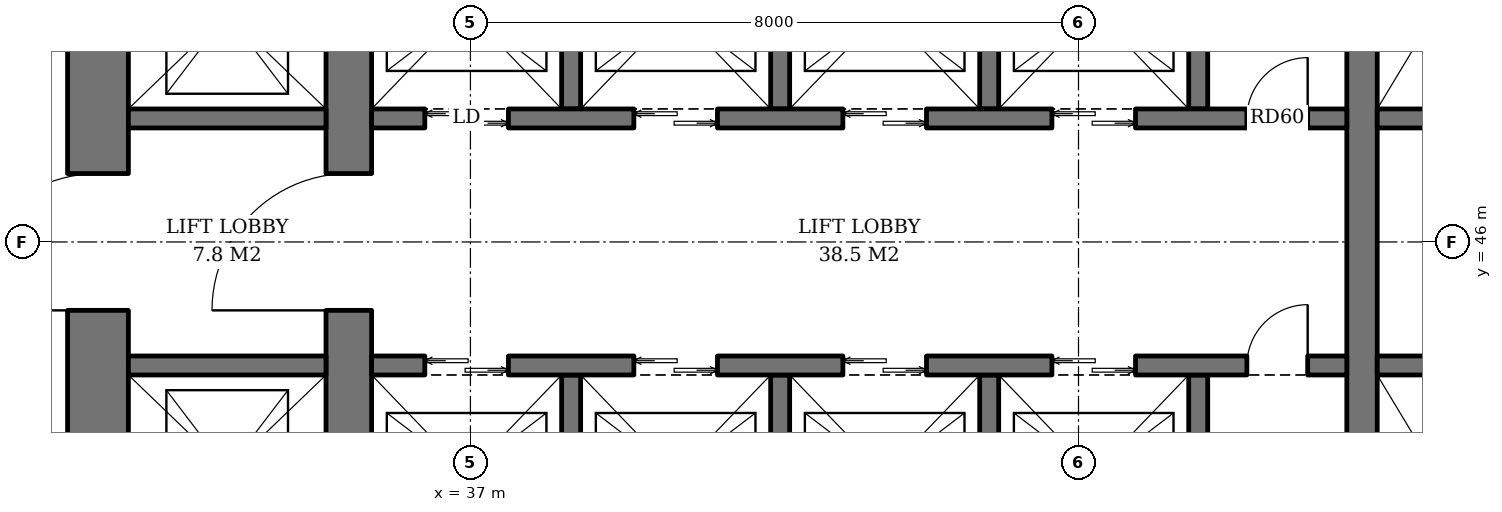
"""IFC4 building model, lengths in metres.
Left out: names, types, materials, properties, quantities, classifications, styles, units other than length and angle.
Written with IfcOpenShell. Run it as: python <this file> out.ifc"""

import sys

from ifc_helpers import new_model, si_unit, direction, frame, frame_2d, origin, place, context, subcontext, project, spatial, rectangle, extrude, element, fill, save


model = new_model("IFC4")
c1 = context("Model", 3, precision=1e-05, world=origin(), true_north=direction((0.0, 1.0)))
c2 = subcontext(c1, "Body", "Model", "MODEL_VIEW")
j1 = project(units=[si_unit("LENGTHUNIT", "METRE"), si_unit("PLANEANGLEUNIT", "RADIAN")], contexts=[c1])
p1 = place(None, origin())
s1 = spatial("IfcSite", under=j1, at=p1, CompositionType="ELEMENT")
p2 = place(p1, origin())
s2 = spatial("IfcBuilding", under=s1, at=p2, CompositionType="ELEMENT")
p3 = place(p2, frame((0.0, 0.0, 74.2)))
s3 = spatial("IfcBuildingStorey", under=s2, at=p3, CompositionType="ELEMENT", Elevation=74.2)
p4 = place(p3, frame((35.4, 36.7, 0.0), z_axis=(0.0, 0.0, 1.0), x_axis=(0.0, 1.0, 0.0)))
e1 = element("IfcWall", 1, at=p4, inside=s3, PredefinedType="SHEAR", context=c2, shape_type="SweptSolid", body=[
    extrude(rectangle(XDim=18.6, YDim=0.6, at=frame_2d((9.3, 0.0))), origin(), (0.0, 0.0, 1.0), 3.8),
])
p5 = place(p4, frame((8.4, 0.0, 0.0)))
e2 = element("IfcOpeningElement", 2, at=p5, cuts=e1, PredefinedType="OPENING", context=c2, shape_type="SweptSolid", body=[
    extrude(rectangle(XDim=1.8, YDim=2.4, at=frame_2d((0.9, 1.2))), frame((0.0, 0.31, 0.0), z_axis=(0.0, -1.0, 0.0), x_axis=(1.0, 0.0, 0.0)), (0.0, 0.0, 1.0), 0.62),
])
p6 = place(p3, frame((32.1, 33.5, 0.0), z_axis=(0.0, 0.0, 1.0), x_axis=(0.0, 1.0, 0.0)))
e3 = element("IfcWall", 3, at=p6, inside=s3, PredefinedType="SHEAR", context=c2, shape_type="SweptSolid", body=[
    extrude(rectangle(XDim=25.0, YDim=0.8, at=frame_2d((12.5, 0.0))), origin(), (0.0, 0.0, 1.0), 3.8),
])
p7 = place(p6, frame((11.6, 0.0, 0.0)))
e4 = element("IfcOpeningElement", 4, at=p7, cuts=e3, PredefinedType="OPENING", context=c2, shape_type="SweptSolid", body=[
    extrude(rectangle(XDim=1.8, YDim=2.4, at=frame_2d((0.9, 1.2))), frame((0.0, 0.41, 0.0), z_axis=(0.0, -1.0, 0.0), x_axis=(1.0, 0.0, 0.0)), (0.0, 0.0, 1.0), 0.82),
])
p8 = place(p3, frame((48.73, 40.0, 0.0), z_axis=(0.0, 0.0, 1.0), x_axis=(0.0, 1.0, 0.0)))
e5 = element("IfcWall", 5, at=p8, inside=s3, PredefinedType="SHEAR", context=c2, shape_type="SweptSolid", body=[
    extrude(rectangle(XDim=12.0, YDim=0.4, at=frame_2d((6.0, 0.0))), origin(), (0.0, 0.0, 1.0), 3.8),
])
for number, where, z_axis, x_axis in (
    (6, (38.325, 47.75, 0.0), (0.0, 0.0, 1.0), (0.0, 1.0, 0.0)),
    (7, (41.075, 47.75, 0.0), (0.0, 0.0, 1.0), (0.0, 1.0, 0.0)),
    (8, (43.825, 47.75, 0.0), (0.0, 0.0, 1.0), (0.0, 1.0, 0.0)),
    (9, (46.575, 47.75, 0.0), (0.0, 0.0, 1.0), (0.0, 1.0, 0.0)),
):
    element("IfcWall", number, at=place(p3, frame(where, z_axis=z_axis, x_axis=x_axis)), inside=s3, PredefinedType="SHEAR", context=c2, shape_type="SweptSolid", body=[
        extrude(rectangle(XDim=2.6, YDim=0.25, at=frame_2d((1.3, 0.0))), origin(), (0.0, 0.0, 1.0), 3.8),
    ])
p9 = place(p3, frame((35.7, 47.625, 0.0), z_axis=(0.0, 0.0, 1.0), x_axis=(1.0, 0.0, 0.0)))
e10 = element("IfcWall", 10, at=p9, inside=s3, PredefinedType="SHEAR", context=c2, shape_type="SweptSolid", body=[
    extrude(rectangle(XDim=12.83, YDim=0.25, at=frame_2d((6.415, 0.0))), origin(), (0.0, 0.0, 1.0), 3.8),
])
p10 = place(p9, frame((0.7, 0.0, 0.0)))
e11 = element("IfcOpeningElement", 11, at=p10, cuts=e10, PredefinedType="OPENING", context=c2, shape_type="SweptSolid", body=[
    extrude(rectangle(XDim=1.1, YDim=2.2, at=frame_2d((0.55, 1.1))), frame((0.0, 0.135, 0.0), z_axis=(0.0, -1.0, 0.0), x_axis=(1.0, 0.0, 0.0)), (0.0, 0.0, 1.0), 0.27),
])
p11 = place(p9, frame((3.45, 0.0, 0.0)))
e12 = element("IfcOpeningElement", 12, at=p11, cuts=e10, PredefinedType="OPENING", context=c2, shape_type="SweptSolid", body=[
    extrude(rectangle(XDim=1.1, YDim=2.2, at=frame_2d((0.55, 1.1))), frame((0.0, 0.135, 0.0), z_axis=(0.0, -1.0, 0.0), x_axis=(1.0, 0.0, 0.0)), (0.0, 0.0, 1.0), 0.27),
])
p12 = place(p9, frame((6.2, 0.0, 0.0)))
e13 = element("IfcOpeningElement", 13, at=p12, cuts=e10, PredefinedType="OPENING", context=c2, shape_type="SweptSolid", body=[
    extrude(rectangle(XDim=1.1, YDim=2.2, at=frame_2d((0.55, 1.1))), frame((0.0, 0.135, 0.0), z_axis=(0.0, -1.0, 0.0), x_axis=(1.0, 0.0, 0.0)), (0.0, 0.0, 1.0), 0.27),
])
p13 = place(p9, frame((8.95, 0.0, 0.0)))
e14 = element("IfcOpeningElement", 14, at=p13, cuts=e10, PredefinedType="OPENING", context=c2, shape_type="SweptSolid", body=[
    extrude(rectangle(XDim=1.1, YDim=2.2, at=frame_2d((0.55, 1.1))), frame((0.0, 0.135, 0.0), z_axis=(0.0, -1.0, 0.0), x_axis=(1.0, 0.0, 0.0)), (0.0, 0.0, 1.0), 0.27),
])
p14 = place(p9, frame((11.515, 0.0, 0.0)))
e15 = element("IfcOpeningElement", 15, at=p14, cuts=e10, PredefinedType="OPENING", context=c2, shape_type="SweptSolid", body=[
    extrude(rectangle(XDim=0.8, YDim=2.0, at=frame_2d((0.4, 1.0))), frame((0.0, 0.135, 0.0), z_axis=(0.0, -1.0, 0.0), x_axis=(1.0, 0.0, 0.0)), (0.0, 0.0, 1.0), 0.27),
])
for number, where, z_axis, x_axis in (
    (16, (38.325, 44.25, 0.0), (0.0, 0.0, 1.0), (0.0, -1.0, 0.0)),
    (17, (41.075, 44.25, 0.0), (0.0, 0.0, 1.0), (0.0, -1.0, 0.0)),
    (18, (43.825, 44.25, 0.0), (0.0, 0.0, 1.0), (0.0, -1.0, 0.0)),
    (19, (46.575, 44.25, 0.0), (0.0, 0.0, 1.0), (0.0, -1.0, 0.0)),
):
    element("IfcWall", number, at=place(p3, frame(where, z_axis=z_axis, x_axis=x_axis)), inside=s3, PredefinedType="SHEAR", context=c2, shape_type="SweptSolid", body=[
        extrude(rectangle(XDim=2.6, YDim=0.25, at=frame_2d((1.3, 0.0))), origin(), (0.0, 0.0, 1.0), 3.8),
    ])
p15 = place(p3, frame((35.7, 44.375, 0.0), z_axis=(0.0, 0.0, 1.0), x_axis=(1.0, 0.0, 0.0)))
e20 = element("IfcWall", 20, at=p15, inside=s3, PredefinedType="SHEAR", context=c2, shape_type="SweptSolid", body=[
    extrude(rectangle(XDim=12.83, YDim=0.25, at=frame_2d((6.415, 0.0))), origin(), (0.0, 0.0, 1.0), 3.8),
])
p16 = place(p15, frame((0.7, 0.0, 0.0)))
e21 = element("IfcOpeningElement", 21, at=p16, cuts=e20, PredefinedType="OPENING", context=c2, shape_type="SweptSolid", body=[
    extrude(rectangle(XDim=1.1, YDim=2.2, at=frame_2d((0.55, 1.1))), frame((0.0, 0.135, 0.0), z_axis=(0.0, -1.0, 0.0), x_axis=(1.0, 0.0, 0.0)), (0.0, 0.0, 1.0), 0.27),
])
p17 = place(p15, frame((3.45, 0.0, 0.0)))
e22 = element("IfcOpeningElement", 22, at=p17, cuts=e20, PredefinedType="OPENING", context=c2, shape_type="SweptSolid", body=[
    extrude(rectangle(XDim=1.1, YDim=2.2, at=frame_2d((0.55, 1.1))), frame((0.0, 0.135, 0.0), z_axis=(0.0, -1.0, 0.0), x_axis=(1.0, 0.0, 0.0)), (0.0, 0.0, 1.0), 0.27),
])
p18 = place(p15, frame((6.2, 0.0, 0.0)))
e23 = element("IfcOpeningElement", 23, at=p18, cuts=e20, PredefinedType="OPENING", context=c2, shape_type="SweptSolid", body=[
    extrude(rectangle(XDim=1.1, YDim=2.2, at=frame_2d((0.55, 1.1))), frame((0.0, 0.135, 0.0), z_axis=(0.0, -1.0, 0.0), x_axis=(1.0, 0.0, 0.0)), (0.0, 0.0, 1.0), 0.27),
])
p19 = place(p15, frame((8.95, 0.0, 0.0)))
e24 = element("IfcOpeningElement", 24, at=p19, cuts=e20, PredefinedType="OPENING", context=c2, shape_type="SweptSolid", body=[
    extrude(rectangle(XDim=1.1, YDim=2.2, at=frame_2d((0.55, 1.1))), frame((0.0, 0.135, 0.0), z_axis=(0.0, -1.0, 0.0), x_axis=(1.0, 0.0, 0.0)), (0.0, 0.0, 1.0), 0.27),
])
p20 = place(p15, frame((11.515, 0.0, 0.0)))
e25 = element("IfcOpeningElement", 25, at=p20, cuts=e20, PredefinedType="OPENING", context=c2, shape_type="SweptSolid", body=[
    extrude(rectangle(XDim=0.8, YDim=2.0, at=frame_2d((0.4, 1.0))), frame((0.0, 0.135, 0.0), z_axis=(0.0, -1.0, 0.0), x_axis=(1.0, 0.0, 0.0)), (0.0, 0.0, 1.0), 0.27),
])
for number, where, z_axis, x_axis in (
    (26, (48.93, 47.625, 0.0), (0.0, 0.0, 1.0), (1.0, 0.0, 0.0)),
    (27, (48.93, 44.375, 0.0), (0.0, 0.0, 1.0), (1.0, 0.0, 0.0)),
):
    element("IfcWall", number, at=place(p3, frame(where, z_axis=z_axis, x_axis=x_axis)), inside=s3, PredefinedType="SHEAR", context=c2, shape_type="SweptSolid", body=[
        extrude(rectangle(XDim=5.37, YDim=0.25, at=frame_2d((2.685, 0.0))), origin(), (0.0, 0.0, 1.0), 3.8),
    ])
for number, where, z_axis, x_axis in (
    (28, (32.5, 44.375, 0.0), (0.0, 0.0, 1.0), (1.0, 0.0, 0.0)),
    (29, (32.5, 47.625, 0.0), (0.0, 0.0, 1.0), (1.0, 0.0, 0.0)),
):
    element("IfcWall", number, at=place(p3, frame(where, z_axis=z_axis, x_axis=x_axis)), inside=s3, PredefinedType="SHEAR", context=c2, shape_type="SweptSolid", body=[
        extrude(rectangle(XDim=2.6, YDim=0.25, at=frame_2d((1.3, 0.0))), origin(), (0.0, 0.0, 1.0), 3.8),
    ])
p21 = place(p10, origin())
e30 = element("IfcDoor", 30, at=p21, inside=s3, OperationType="DOUBLE_DOOR_SLIDING", PredefinedType="DOOR", context=c2, shape_type="SweptSolid", body=[
    extrude(rectangle(XDim=1.1, YDim=2.2, at=frame_2d((0.55, 1.1))), frame((0.0, 0.025, 0.0), z_axis=(0.0, -1.0, 0.0), x_axis=(1.0, 0.0, 0.0)), (0.0, 0.0, 1.0), 0.05),
])
fill(e11, e30)
p22 = place(p11, origin())
e31 = element("IfcDoor", 31, at=p22, inside=s3, OperationType="DOUBLE_DOOR_SLIDING", PredefinedType="DOOR", context=c2, shape_type="SweptSolid", body=[
    extrude(rectangle(XDim=1.1, YDim=2.2, at=frame_2d((0.55, 1.1))), frame((0.0, 0.025, 0.0), z_axis=(0.0, -1.0, 0.0), x_axis=(1.0, 0.0, 0.0)), (0.0, 0.0, 1.0), 0.05),
])
fill(e12, e31)
p23 = place(p12, origin())
e32 = element("IfcDoor", 32, at=p23, inside=s3, OperationType="DOUBLE_DOOR_SLIDING", PredefinedType="DOOR", context=c2, shape_type="SweptSolid", body=[
    extrude(rectangle(XDim=1.1, YDim=2.2, at=frame_2d((0.55, 1.1))), frame((0.0, 0.025, 0.0), z_axis=(0.0, -1.0, 0.0), x_axis=(1.0, 0.0, 0.0)), (0.0, 0.0, 1.0), 0.05),
])
fill(e13, e32)
p24 = place(p13, origin())
e33 = element("IfcDoor", 33, at=p24, inside=s3, OperationType="DOUBLE_DOOR_SLIDING", PredefinedType="DOOR", context=c2, shape_type="SweptSolid", body=[
    extrude(rectangle(XDim=1.1, YDim=2.2, at=frame_2d((0.55, 1.1))), frame((0.0, 0.025, 0.0), z_axis=(0.0, -1.0, 0.0), x_axis=(1.0, 0.0, 0.0)), (0.0, 0.0, 1.0), 0.05),
])
fill(e14, e33)
p25 = place(p14, origin())
e34 = element("IfcDoor", 34, at=p25, inside=s3, OperationType="SINGLE_SWING_RIGHT", PredefinedType="DOOR", context=c2, shape_type="SweptSolid", body=[
    extrude(rectangle(XDim=0.8, YDim=2.0, at=frame_2d((0.4, 1.0))), frame((0.0, 0.025, 0.0), z_axis=(0.0, -1.0, 0.0), x_axis=(1.0, 0.0, 0.0)), (0.0, 0.0, 1.0), 0.05),
])
fill(e15, e34)
p26 = place(p16, origin())
e35 = element("IfcDoor", 35, at=p26, inside=s3, OperationType="DOUBLE_DOOR_SLIDING", PredefinedType="DOOR", context=c2, shape_type="SweptSolid", body=[
    extrude(rectangle(XDim=1.1, YDim=2.2, at=frame_2d((0.55, 1.1))), frame((0.0, 0.025, 0.0), z_axis=(0.0, -1.0, 0.0), x_axis=(1.0, 0.0, 0.0)), (0.0, 0.0, 1.0), 0.05),
])
fill(e21, e35)
p27 = place(p17, origin())
e36 = element("IfcDoor", 36, at=p27, inside=s3, OperationType="DOUBLE_DOOR_SLIDING", PredefinedType="DOOR", context=c2, shape_type="SweptSolid", body=[
    extrude(rectangle(XDim=1.1, YDim=2.2, at=frame_2d((0.55, 1.1))), frame((0.0, 0.025, 0.0), z_axis=(0.0, -1.0, 0.0), x_axis=(1.0, 0.0, 0.0)), (0.0, 0.0, 1.0), 0.05),
])
fill(e22, e36)
p28 = place(p18, origin())
e37 = element("IfcDoor", 37, at=p28, inside=s3, OperationType="DOUBLE_DOOR_SLIDING", PredefinedType="DOOR", context=c2, shape_type="SweptSolid", body=[
    extrude(rectangle(XDim=1.1, YDim=2.2, at=frame_2d((0.55, 1.1))), frame((0.0, 0.025, 0.0), z_axis=(0.0, -1.0, 0.0), x_axis=(1.0, 0.0, 0.0)), (0.0, 0.0, 1.0), 0.05),
])
fill(e23, e37)
p29 = place(p19, origin())
e38 = element("IfcDoor", 38, at=p29, inside=s3, OperationType="DOUBLE_DOOR_SLIDING", PredefinedType="DOOR", context=c2, shape_type="SweptSolid", body=[
    extrude(rectangle(XDim=1.1, YDim=2.2, at=frame_2d((0.55, 1.1))), frame((0.0, 0.025, 0.0), z_axis=(0.0, -1.0, 0.0), x_axis=(1.0, 0.0, 0.0)), (0.0, 0.0, 1.0), 0.05),
])
fill(e24, e38)
p30 = place(p20, origin())
e39 = element("IfcDoor", 39, at=p30, inside=s3, OperationType="SINGLE_SWING_RIGHT", PredefinedType="DOOR", context=c2, shape_type="SweptSolid", body=[
    extrude(rectangle(XDim=0.8, YDim=2.0, at=frame_2d((0.4, 1.0))), frame((0.0, 0.025, 0.0), z_axis=(0.0, -1.0, 0.0), x_axis=(1.0, 0.0, 0.0)), (0.0, 0.0, 1.0), 0.05),
])
fill(e25, e39)
p31 = place(p5, origin())
e40 = element("IfcDoor", 40, at=p31, inside=s3, OperationType="DOUBLE_DOOR_SINGLE_SWING", PredefinedType="DOOR", context=c2, shape_type="SweptSolid", body=[
    extrude(rectangle(XDim=1.8, YDim=2.4, at=frame_2d((0.9, 1.2))), frame((0.0, 0.025, 0.0), z_axis=(0.0, -1.0, 0.0), x_axis=(1.0, 0.0, 0.0)), (0.0, 0.0, 1.0), 0.05),
])
fill(e2, e40)
p32 = place(p7, origin())
e41 = element("IfcDoor", 41, at=p32, inside=s3, OperationType="DOUBLE_DOOR_SINGLE_SWING", PredefinedType="DOOR", context=c2, shape_type="SweptSolid", body=[
    extrude(rectangle(XDim=1.8, YDim=2.4, at=frame_2d((0.9, 1.2))), frame((0.0, 0.025, 0.0), z_axis=(0.0, -1.0, 0.0), x_axis=(1.0, 0.0, 0.0)), (0.0, 0.0, 1.0), 0.05),
])
fill(e4, e41)
save(model, sys.argv[1])
